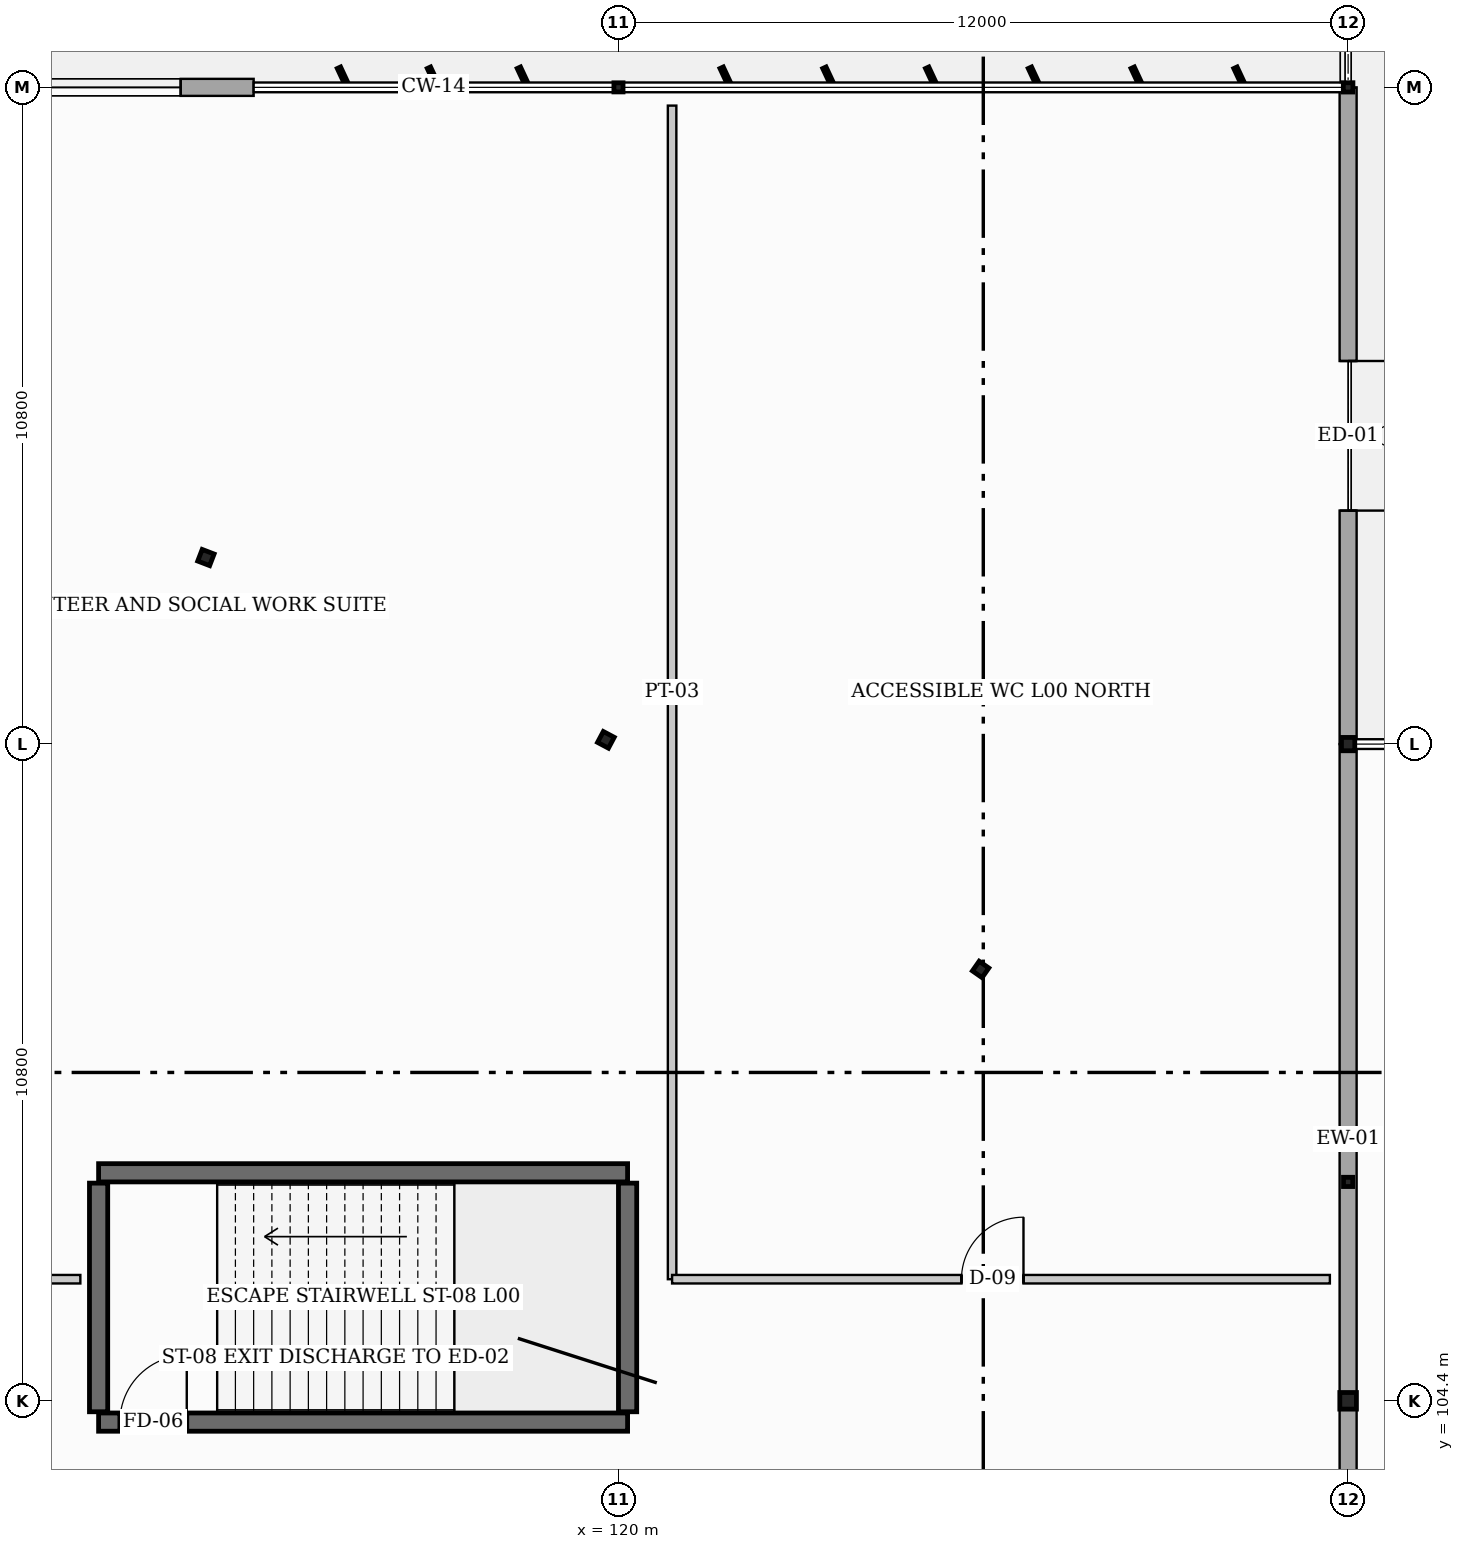
"""IFC4 building model, lengths in metres.
Left out: names, types, materials, properties, quantities, classifications, styles, units other than length and angle.
Written with IfcOpenShell. Run it as: python <this file> out.ifc"""

import sys

from ifc_helpers import new_model, si_unit, direction, frame, frame_2d, origin, origin_2d, place, context, subcontext, project, spatial, rectangle, hollow_rectangle, hollow_circle, i_section, extrude, element, fill, save


model = new_model("IFC4")
c1 = context("Model", 3, precision=1e-05, world=origin(), true_north=direction((0.0, 1.0)))
c2 = subcontext(c1, "Body", "Model", "MODEL_VIEW")
j1 = project(units=[si_unit("LENGTHUNIT", "METRE"), si_unit("PLANEANGLEUNIT", "RADIAN")], contexts=[c1])
p1 = place(None, origin())
s1 = spatial("IfcSite", under=j1, at=p1, CompositionType="ELEMENT")
p2 = place(p1, origin())
s2 = spatial("IfcBuilding", under=s1, at=p2, CompositionType="ELEMENT")
p3 = place(p2, origin())
s3 = spatial("IfcBuildingStorey", under=s2, at=p3, CompositionType="ELEMENT", Elevation=0.0)
p4 = place(p3, frame((120.0, 126.0, 0.0), z_axis=(0.0, 0.0, 1.0), x_axis=(1.0, 0.0, 0.0)))
e1 = element("IfcColumn", 1, at=p4, inside=s3, PredefinedType="COLUMN", context=c2, shape_type="SweptSolid", body=[
    extrude(hollow_rectangle(XDim=0.15, YDim=0.15, WallThickness=0.008, at=origin_2d()), origin(), (0.0, 0.0, 1.0), 4.8),
])
p5 = place(p3, frame((132.0, 104.4, 0.0), z_axis=(0.0, 0.0, 1.0), x_axis=(0.0, 1.0, 0.0)))
e2 = element("IfcColumn", 2, at=p5, inside=s3, PredefinedType="COLUMN", context=c2, shape_type="SweptSolid", body=[
    extrude(hollow_circle(Radius=0.136, WallThickness=0.013, at=origin_2d()), origin(), (0.0, 0.0, 1.0), 4.8),
])
p6 = place(p3, frame((132.0, 115.2, 0.0), z_axis=(0.0, 0.0, 1.0), x_axis=(0.0, 1.0, 0.0)))
e3 = element("IfcColumn", 3, at=p6, inside=s3, PredefinedType="COLUMN", context=c2, shape_type="SweptSolid", body=[
    extrude(hollow_circle(Radius=0.11, WallThickness=0.01, at=origin_2d()), origin(), (0.0, 0.0, 1.0), 4.8),
])
p7 = place(p3, frame((132.0, 126.0, 0.0), z_axis=(0.0, 0.0, 1.0), x_axis=(0.0, 1.0, 0.0)))
e4 = element("IfcColumn", 4, at=p7, inside=s3, PredefinedType="COLUMN", context=c2, shape_type="SweptSolid", body=[
    extrude(i_section(OverallWidth=0.153, OverallDepth=0.158, WebThickness=0.007, FlangeThickness=0.01, at=origin_2d()), origin(), (0.0, 0.0, 1.0), 4.8),
])
p8 = place(p3, frame((113.215, 118.268, 0.0), z_axis=(0.0, 0.0, 1.0), x_axis=(0.358367949545, 0.933580426497, 0.0)))
e5 = element("IfcColumn", 5, at=p8, inside=s3, PredefinedType="COLUMN", context=c2, shape_type="SweptSolid", body=[
    extrude(i_section(OverallWidth=0.205, OverallDepth=0.21, WebThickness=0.009, FlangeThickness=0.014, at=origin_2d()), origin(), (0.0, 0.0, 1.0), 4.8),
])
p9 = place(p3, frame((119.793, 115.27, 0.0), z_axis=(0.0, 0.0, 1.0), x_axis=(0.469471562786, 0.882947592859, 0.0)))
e6 = element("IfcColumn", 6, at=p9, inside=s3, PredefinedType="COLUMN", context=c2, shape_type="SweptSolid", body=[
    extrude(i_section(OverallWidth=0.203, OverallDepth=0.203, WebThickness=0.007, FlangeThickness=0.011, at=origin_2d()), origin(), (0.0, 0.0, 1.0), 4.8),
])
p10 = place(p3, frame((125.956, 111.494, 0.0), z_axis=(0.0, 0.0, 1.0), x_axis=(0.573576436351, 0.819152044289, 0.0)))
e7 = element("IfcColumn", 7, at=p10, inside=s3, PredefinedType="COLUMN", context=c2, shape_type="SweptSolid", body=[
    extrude(hollow_circle(Radius=0.097, WallThickness=0.008, at=origin_2d()), origin(), (0.0, 0.0, 1.0), 4.8),
])
p11 = place(p3, frame((132.0, 108.0, 0.0), z_axis=(0.0, 0.0, 1.0), x_axis=(1.0, 0.0, 0.0)))
e8 = element("IfcColumn", 8, at=p11, inside=s3, PredefinedType="COLUMN", context=c2, shape_type="SweptSolid", body=[
    extrude(i_section(OverallWidth=0.152, OverallDepth=0.152, WebThickness=0.006, FlangeThickness=0.007, at=origin_2d()), origin(), (0.0, 0.0, 1.0), 4.8),
])
p12 = place(p3, frame((111.45, 104.05, 0.0), z_axis=(0.0, 0.0, 1.0), x_axis=(1.0, 0.0, 0.0)))
e9 = element("IfcWall", 9, at=p12, inside=s3, PredefinedType="SHEAR", context=c2, shape_type="SweptSolid", body=[
    extrude(rectangle(XDim=8.7, YDim=0.3, at=frame_2d((4.35, 0.0))), origin(), (0.0, 0.0, 1.0), 4.8),
])
p13 = place(p12, frame((0.35, 0.0, 0.0)))
e10 = element("IfcOpeningElement", 10, at=p13, cuts=e9, PredefinedType="OPENING", context=c2, shape_type="SweptSolid", body=[
    extrude(rectangle(XDim=1.1, YDim=2.15, at=frame_2d((0.55, 1.075))), frame((0.0, 0.16, 0.0), z_axis=(0.0, -1.0, 0.0), x_axis=(1.0, 0.0, 0.0)), (0.0, 0.0, 1.0), 0.32),
])
p14 = place(p3, frame((120.15, 108.15, 0.0), z_axis=(0.0, 0.0, 1.0), x_axis=(-1.0, 0.0, 0.0)))
e11 = element("IfcWall", 11, at=p14, inside=s3, PredefinedType="SHEAR", context=c2, shape_type="SweptSolid", body=[
    extrude(rectangle(XDim=8.7, YDim=0.3, at=frame_2d((4.35, 0.0))), origin(), (0.0, 0.0, 1.0), 4.8),
])
for number, where, z_axis, x_axis in (
    (12, (111.45, 104.22, 0.0), (0.0, 0.0, 1.0), (0.0, 1.0, 0.0)),
    (13, (120.15, 104.22, 0.0), (0.0, 0.0, 1.0), (0.0, 1.0, 0.0)),
):
    element("IfcWall", number, at=place(p3, frame(where, z_axis=z_axis, x_axis=x_axis)), inside=s3, PredefinedType="SHEAR", context=c2, shape_type="SweptSolid", body=[
        extrude(rectangle(XDim=3.76, YDim=0.3, at=frame_2d((1.88, 0.0))), origin(), (0.0, 0.0, 1.0), 4.8),
    ])
p15 = place(p3, frame((96.0, 126.0, 0.0), z_axis=(0.0, 0.0, 1.0), x_axis=(1.0, 0.0, 0.0)))
e14 = element("IfcWall", 14, at=p15, inside=s3, PredefinedType="STANDARD", context=c2, shape_type="SweptSolid", body=[
    extrude(rectangle(XDim=18.0, YDim=0.28, at=frame_2d((9.0, 0.0))), origin(), (0.0, 0.0, 1.0), 3.97),
])
p16 = place(p15, frame((4.5, 0.0, 0.0)))
e15 = element("IfcOpeningElement", 15, at=p16, cuts=e14, PredefinedType="OPENING", context=c2, shape_type="SweptSolid", body=[
    extrude(rectangle(XDim=2.3, YDim=2.3, at=frame_2d((1.15, 1.15))), frame((0.0, 0.15, 0.0), z_axis=(0.0, -1.0, 0.0), x_axis=(1.0, 0.0, 0.0)), (0.0, 0.0, 1.0), 0.3),
])
p17 = place(p15, frame((0.67, 0.0, 0.0)))
e16 = element("IfcOpeningElement", 16, at=p17, cuts=e14, PredefinedType="OPENING", context=c2, shape_type="SweptSolid", body=[
    extrude(rectangle(XDim=2.3, YDim=2.3, at=frame_2d((1.15, 1.15))), frame((0.0, 0.15, 0.0), z_axis=(0.0, -1.0, 0.0), x_axis=(1.0, 0.0, 0.0)), (0.0, 0.0, 1.0), 0.3),
])
p18 = place(p15, frame((14.0, 0.0, 0.95)))
e17 = element("IfcOpeningElement", 17, at=p18, cuts=e14, PredefinedType="OPENING", context=c2, shape_type="SweptSolid", body=[
    extrude(rectangle(XDim=2.8, YDim=2.1, at=frame_2d((1.4, 1.05))), frame((0.0, 0.15, 0.0), z_axis=(0.0, -1.0, 0.0), x_axis=(1.0, 0.0, 0.0)), (0.0, 0.0, 1.0), 0.3),
])
p19 = place(p3, frame((132.0, 115.2, 0.0), z_axis=(0.0, 0.0, 1.0), x_axis=(0.0, -1.0, 0.0)))
e18 = element("IfcWall", 18, at=p19, inside=s3, PredefinedType="STANDARD", context=c2, shape_type="SweptSolid", body=[
    extrude(rectangle(XDim=21.6, YDim=0.28, at=frame_2d((10.8, 0.0))), origin(), (0.0, 0.0, 1.0), 3.48),
])
p20 = place(p19, frame((13.0, 0.0, 0.0)))
e19 = element("IfcOpeningElement", 19, at=p20, cuts=e18, PredefinedType="OPENING", context=c2, shape_type="SweptSolid", body=[
    extrude(rectangle(XDim=2.3, YDim=2.3, at=frame_2d((1.15, 1.15))), frame((0.0, 0.15, 0.0), z_axis=(0.0, -1.0, 0.0), x_axis=(1.0, 0.0, 0.0)), (0.0, 0.0, 1.0), 0.3),
])
p21 = place(p3, frame((132.0, 126.0, 0.0), z_axis=(0.0, 0.0, 1.0), x_axis=(0.0, -1.0, 0.0)))
e20 = element("IfcWall", 20, at=p21, inside=s3, PredefinedType="STANDARD", context=c2, shape_type="SweptSolid", body=[
    extrude(rectangle(XDim=10.8, YDim=0.28, at=frame_2d((5.4, 0.0))), origin(), (0.0, 0.0, 1.0), 3.48),
])
p22 = place(p21, frame((4.5, 0.0, 0.0)))
e21 = element("IfcOpeningElement", 21, at=p22, cuts=e20, PredefinedType="OPENING", context=c2, shape_type="SweptSolid", body=[
    extrude(rectangle(XDim=2.46, YDim=2.4, at=frame_2d((1.23, 1.2))), frame((0.0, 0.15, 0.0), z_axis=(0.0, -1.0, 0.0), x_axis=(1.0, 0.0, 0.0)), (0.0, 0.0, 1.0), 0.3),
])
p23 = place(p3, frame((104.8, 106.4, 0.0), z_axis=(0.0, 0.0, 1.0), x_axis=(1.0, 0.0, 0.0)))
e22 = element("IfcWall", 22, at=p23, inside=s3, PredefinedType="PARTITIONING", context=c2, shape_type="SweptSolid", body=[
    extrude(rectangle(XDim=6.35, YDim=0.14, at=frame_2d((3.175, 0.0))), origin(), (0.0, 0.0, 1.0), 4.445),
])
p24 = place(p23, frame((0.32, 0.0, 0.0)))
e23 = element("IfcOpeningElement", 23, at=p24, cuts=e22, PredefinedType="OPENING", context=c2, shape_type="SweptSolid", body=[
    extrude(rectangle(XDim=1.06, YDim=2.1, at=frame_2d((0.53, 1.05))), frame((0.0, 0.08, 0.0), z_axis=(0.0, -1.0, 0.0), x_axis=(1.0, 0.0, 0.0)), (0.0, 0.0, 1.0), 0.16),
])
p25 = place(p3, frame((120.882, 106.4, 0.0), z_axis=(0.0, 0.0, 1.0), x_axis=(0.0, 1.0, 0.0)))
e24 = element("IfcWall", 24, at=p25, inside=s3, PredefinedType="PARTITIONING", context=c2, shape_type="SweptSolid", body=[
    extrude(rectangle(XDim=19.3, YDim=0.14, at=frame_2d((9.65, 0.0))), origin(), (0.0, 0.0, 1.0), 4.228),
])
p26 = place(p3, frame((120.882, 106.4, 0.0), z_axis=(0.0, 0.0, 1.0), x_axis=(1.0, 0.0, 0.0)))
e25 = element("IfcWall", 25, at=p26, inside=s3, PredefinedType="PARTITIONING", context=c2, shape_type="SweptSolid", body=[
    extrude(rectangle(XDim=10.818, YDim=0.14, at=frame_2d((5.409, 0.0))), origin(), (0.0, 0.0, 1.0), 3.976),
])
p27 = place(p26, frame((4.759, 0.0, 0.0)))
e26 = element("IfcOpeningElement", 26, at=p27, cuts=e25, PredefinedType="OPENING", context=c2, shape_type="SweptSolid", body=[
    extrude(rectangle(XDim=1.02, YDim=2.08, at=frame_2d((0.51, 1.04))), frame((0.0, 0.08, 0.0), z_axis=(0.0, -1.0, 0.0), x_axis=(1.0, 0.0, 0.0)), (0.0, 0.0, 1.0), 0.16),
])
p28 = place(p18, origin())
e27 = element("IfcWindow", 27, at=p28, inside=s3, PartitioningType="TRIPLE_PANEL_VERTICAL", PredefinedType="WINDOW", context=c2, shape_type="SweptSolid", body=[
    extrude(rectangle(XDim=2.8, YDim=2.1, at=frame_2d((1.4, 1.05))), frame((0.0, 0.03, 0.0), z_axis=(0.0, -1.0, 0.0), x_axis=(1.0, 0.0, 0.0)), (0.0, 0.0, 1.0), 0.06),
])
fill(e17, e27)
p29 = place(p22, origin())
e28 = element("IfcDoor", 28, at=p29, inside=s3, OperationType="DOUBLE_DOOR_SINGLE_SWING", PredefinedType="DOOR", context=c2, shape_type="SweptSolid", body=[
    extrude(rectangle(XDim=2.46, YDim=2.4, at=frame_2d((1.23, 1.2))), frame((0.0, 0.025, 0.0), z_axis=(0.0, -1.0, 0.0), x_axis=(1.0, 0.0, 0.0)), (0.0, 0.0, 1.0), 0.05),
])
fill(e21, e28)
p30 = place(p13, origin())
e29 = element("IfcDoor", 29, at=p30, inside=s3, OperationType="SINGLE_SWING_RIGHT", PredefinedType="DOOR", context=c2, shape_type="SweptSolid", body=[
    extrude(rectangle(XDim=1.1, YDim=2.15, at=frame_2d((0.55, 1.075))), frame((0.0, 0.025, 0.0), z_axis=(0.0, -1.0, 0.0), x_axis=(1.0, 0.0, 0.0)), (0.0, 0.0, 1.0), 0.05),
])
fill(e10, e29)
p31 = place(p27, origin())
e30 = element("IfcDoor", 30, at=p31, inside=s3, OperationType="SINGLE_SWING_RIGHT", PredefinedType="DOOR", context=c2, shape_type="SweptSolid", body=[
    extrude(rectangle(XDim=1.02, YDim=2.08, at=frame_2d((0.51, 1.04))), frame((0.0, 0.025, 0.0), z_axis=(0.0, -1.0, 0.0), x_axis=(1.0, 0.0, 0.0)), (0.0, 0.0, 1.0), 0.05),
])
fill(e26, e30)
save(model, sys.argv[1])
